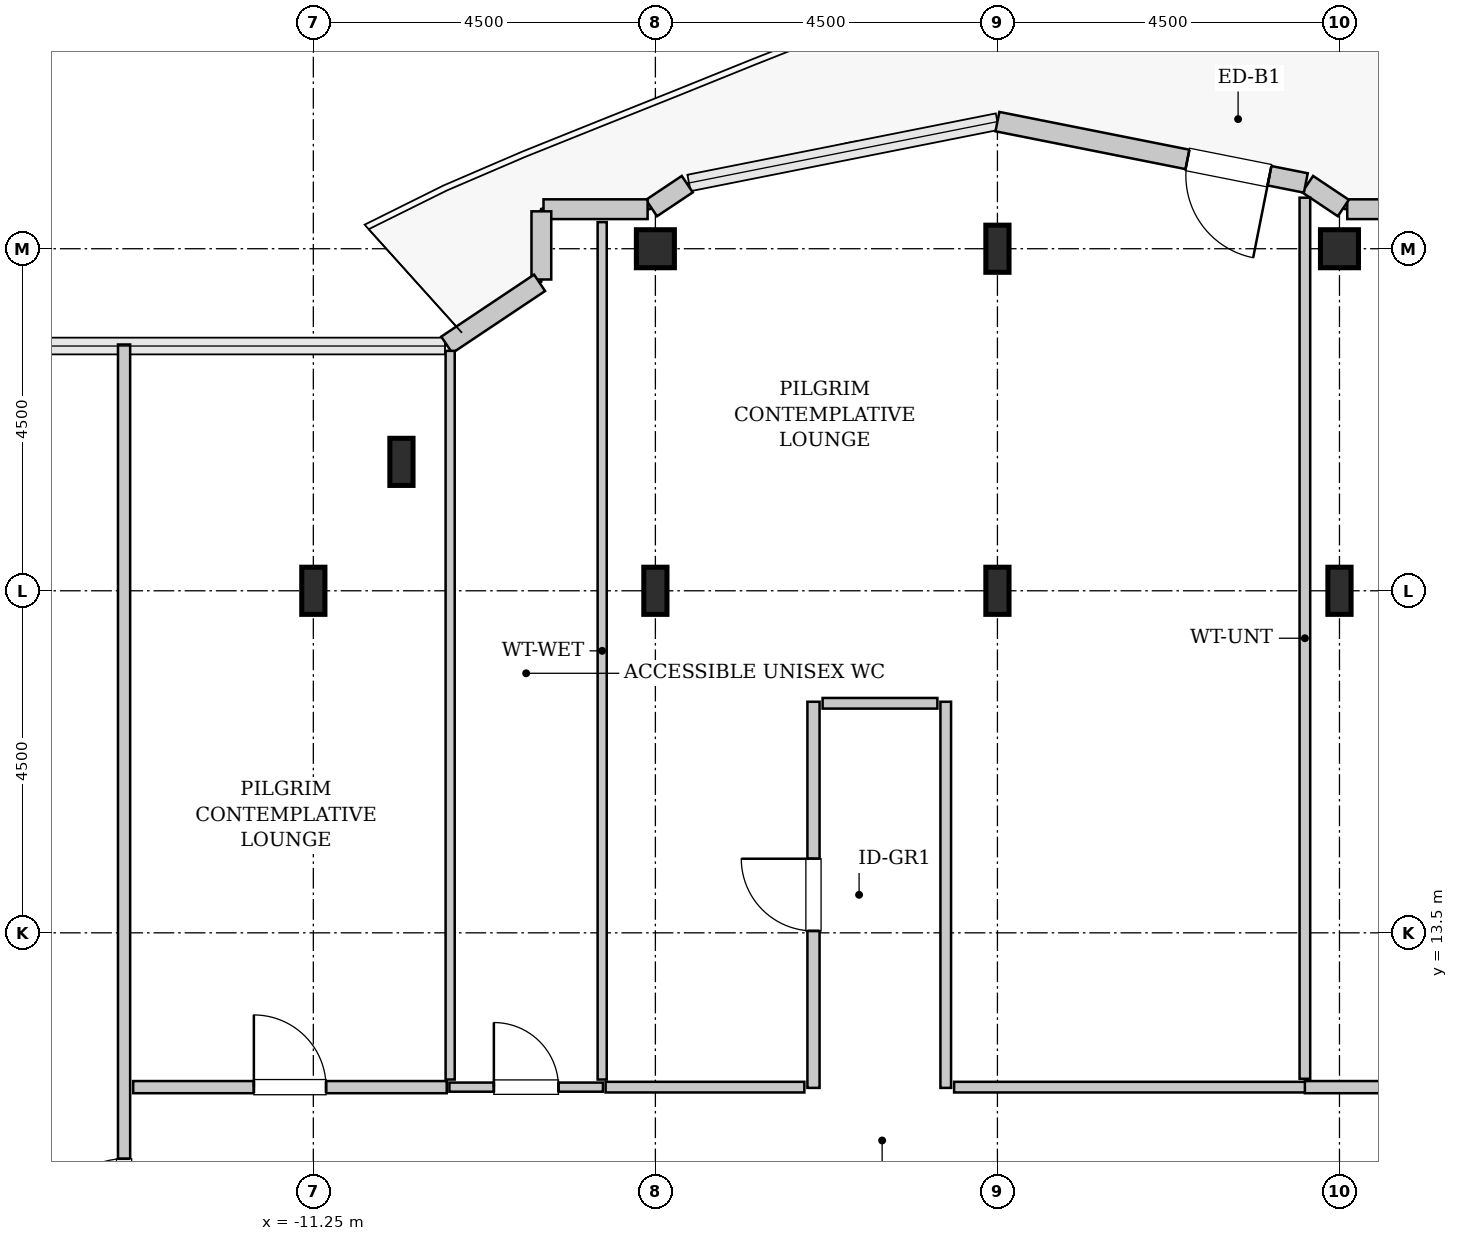
"""IFC4 building model, lengths in metres.
Left out: names, types, materials, properties, quantities, classifications, styles, units other than length and angle.
Written with IfcOpenShell. Run it as: python <this file> out.ifc"""

import sys

from ifc_helpers import new_model, si_unit, direction, frame, frame_2d, origin, origin_2d, place, context, subcontext, project, spatial, rectangle, hollow_rectangle, i_section, extrude, source, transform, mapped, element, fill, save


model = new_model("IFC4")
c1 = context("Model", 3, precision=1e-05, world=origin(), true_north=direction((0.0, 1.0)))
c2 = subcontext(c1, "Body", "Model", "MODEL_VIEW")
j1 = project(units=[si_unit("LENGTHUNIT", "METRE"), si_unit("PLANEANGLEUNIT", "RADIAN")], contexts=[c1])
p1 = place(None, origin())
s1 = spatial("IfcSite", under=j1, at=p1, CompositionType="ELEMENT")
p2 = place(p1, origin())
s2 = spatial("IfcBuilding", under=s1, at=p2, CompositionType="ELEMENT")
p3 = place(p2, frame((0.0, 0.0, 298.8)))
s3 = spatial("IfcBuildingStorey", under=s2, at=p3, CompositionType="ELEMENT", Elevation=298.8)
m1 = source(origin(), c2, "Body", "SweptSolid", [
    extrude(i_section(OverallWidth=0.305, OverallDepth=0.62, WebThickness=0.021, FlangeThickness=0.04, FilletRadius=0.027, at=origin_2d()), origin(), (0.0, 0.0, 1.0), 3.8),
])
for number, where, z_axis, x_axis in (
    (1, (-11.25, 18.0, 0.0), (0.0, 0.0, 1.0), (1.0, 0.0, 0.0)),
    (2, (-10.091, 19.696, 0.0), (0.0, 0.0, 1.0), (1.0, 0.0, 0.0)),
    (3, (-6.75, 18.0, 0.0), (0.0, 0.0, 1.0), (1.0, 0.0, 0.0)),
):
    element("IfcColumn", number, at=place(p3, frame(where, z_axis=z_axis, x_axis=x_axis)), inside=s3, PredefinedType="COLUMN", context=c2, shape_type="MappedRepresentation", body=[
        mapped(m1, transform((0.0, 0.0, 0.0), x_axis=(1.0, 0.0, 0.0), y_axis=(0.0, 1.0, 0.0), z_axis=(0.0, 0.0, 1.0), scale=1.0)),
    ])
m2 = source(origin(), c2, "Body", "SweptSolid", [
    extrude(hollow_rectangle(XDim=0.5, YDim=0.5, WallThickness=0.025, InnerFilletRadius=0.025, OuterFilletRadius=0.05, at=origin_2d()), origin(), (0.0, 0.0, 1.0), 3.8),
])
p4 = place(p3, frame((-6.75, 22.5, 0.0), z_axis=(0.0, 0.0, 1.0), x_axis=(1.0, 0.0, 0.0)))
e4 = element("IfcColumn", 4, at=p4, inside=s3, PredefinedType="COLUMN", context=c2, shape_type="MappedRepresentation", body=[
    mapped(m2, transform((0.0, 0.0, 0.0), x_axis=(1.0, 0.0, 0.0), y_axis=(0.0, 1.0, 0.0), z_axis=(0.0, 0.0, 1.0), scale=1.0)),
])
for number, where, z_axis, x_axis in (
    (5, (-2.25, 18.0, 0.0), (0.0, 0.0, 1.0), (1.0, 0.0, 0.0)),
    (6, (-2.25, 22.5, 0.0), (0.0, 0.0, 1.0), (1.0, 0.0, 0.0)),
    (7, (2.25, 18.0, 0.0), (0.0, 0.0, 1.0), (1.0, 0.0, 0.0)),
):
    element("IfcColumn", number, at=place(p3, frame(where, z_axis=z_axis, x_axis=x_axis)), inside=s3, PredefinedType="COLUMN", context=c2, shape_type="MappedRepresentation", body=[
        mapped(m1, transform((0.0, 0.0, 0.0), x_axis=(1.0, 0.0, 0.0), y_axis=(0.0, 1.0, 0.0), z_axis=(0.0, 0.0, 1.0), scale=1.0)),
    ])
p5 = place(p3, frame((2.25, 22.5, 0.0), z_axis=(0.0, 0.0, 1.0), x_axis=(1.0, 0.0, 0.0)))
e8 = element("IfcColumn", 8, at=p5, inside=s3, PredefinedType="COLUMN", context=c2, shape_type="MappedRepresentation", body=[
    mapped(m2, transform((0.0, 0.0, 0.0), x_axis=(1.0, 0.0, 0.0), y_axis=(0.0, 1.0, 0.0), z_axis=(0.0, 0.0, 1.0), scale=1.0)),
])
m3 = source(origin(), c2, "Body", "SweptSolid", [
    extrude(rectangle(XDim=1.37, YDim=0.26, at=frame_2d((0.685, 0.0))), origin(), (0.0, 0.0, 1.0), 3.55),
])
p6 = place(p3, frame((3.722, 23.02, 0.0), z_axis=(0.0, 0.0, 1.0), x_axis=(-1.0, 0.0, 0.0)))
e9 = element("IfcWall", 9, at=p6, inside=s3, PredefinedType="SOLIDWALL", context=c2, shape_type="MappedRepresentation", body=[
    mapped(m3, transform((0.0, 0.0, 0.0), x_axis=(1.0, 0.0, 0.0), y_axis=(0.0, 1.0, 0.0), z_axis=(0.0, 0.0, 1.0), scale=1.0)),
])
m4 = source(origin(), c2, "Body", "SweptSolid", [
    extrude(rectangle(XDim=0.565, YDim=0.26, at=frame_2d((0.283, 0.0))), origin(), (0.0, 0.0, 1.0), 3.55),
])
p7 = place(p3, frame((2.301, 23.036, 0.0), z_axis=(0.0, 0.0, 1.0), x_axis=(-0.831651492666, 0.555297933317, 0.0)))
e10 = element("IfcWall", 10, at=p7, inside=s3, PredefinedType="SOLIDWALL", context=c2, shape_type="MappedRepresentation", body=[
    mapped(m4, transform((0.0, 0.0, 0.0), x_axis=(1.0, 0.0, 0.0), y_axis=(0.0, 1.0, 0.0), z_axis=(0.0, 0.0, 1.0), scale=1.0)),
])
m5 = source(origin(), c2, "Body", "SweptSolid", [
    extrude(rectangle(XDim=4.137, YDim=0.26, at=frame_2d((2.068, 0.0))), origin(), (0.0, 0.0, 1.0), 3.55),
])
p8 = place(p3, frame((1.807, 23.365, 0.0), z_axis=(0.0, 0.0, 1.0), x_axis=(-0.980782170794, 0.195105954428, 0.0)))
e11 = element("IfcWall", 11, at=p8, inside=s3, PredefinedType="SOLIDWALL", context=c2, shape_type="MappedRepresentation", body=[
    mapped(m5, transform((0.0, 0.0, 0.0), x_axis=(1.0, 0.0, 0.0), y_axis=(0.0, 1.0, 0.0), z_axis=(0.0, 0.0, 1.0), scale=1.0)),
])
p9 = place(p8, frame((0.488, 0.0, 0.0)))
e12 = element("IfcOpeningElement", 12, at=p9, cuts=e11, PredefinedType="OPENING", context=c2, shape_type="SweptSolid", body=[
    extrude(rectangle(XDim=1.1, YDim=2.2, at=frame_2d((0.55, 1.1))), frame((0.0, 0.14, 0.0), z_axis=(0.0, -1.0, 0.0), x_axis=(1.0, 0.0, 0.0)), (0.0, 0.0, 1.0), 0.28),
])
p10 = place(p3, frame((-6.331, 23.35, 0.0), z_axis=(0.0, 0.0, 1.0), x_axis=(-0.831651492666, -0.555297933317, 0.0)))
e13 = element("IfcWall", 13, at=p10, inside=s3, PredefinedType="SOLIDWALL", context=c2, shape_type="MappedRepresentation", body=[
    mapped(m4, transform((0.0, 0.0, 0.0), x_axis=(1.0, 0.0, 0.0), y_axis=(0.0, 1.0, 0.0), z_axis=(0.0, 0.0, 1.0), scale=1.0)),
])
p11 = place(p3, frame((-6.852, 23.02, 0.0), z_axis=(0.0, 0.0, 1.0), x_axis=(-1.0, 0.0, 0.0)))
e14 = element("IfcWall", 14, at=p11, inside=s3, PredefinedType="SOLIDWALL", context=c2, shape_type="MappedRepresentation", body=[
    mapped(m3, transform((0.0, 0.0, 0.0), x_axis=(1.0, 0.0, 0.0), y_axis=(0.0, 1.0, 0.0), z_axis=(0.0, 0.0, 1.0), scale=1.0)),
])
m6 = source(origin(), c2, "Body", "SweptSolid", [
    extrude(rectangle(XDim=0.897, YDim=0.26, at=frame_2d((0.448, 0.0))), origin(), (0.0, 0.0, 1.0), 3.55),
])
p12 = place(p3, frame((-8.25, 22.992, 0.0), z_axis=(0.0, 0.0, 1.0), x_axis=(0.0, -1.0, 0.0)))
e15 = element("IfcWall", 15, at=p12, inside=s3, PredefinedType="SOLIDWALL", context=c2, shape_type="MappedRepresentation", body=[
    mapped(m6, transform((0.0, 0.0, 0.0), x_axis=(1.0, 0.0, 0.0), y_axis=(0.0, 1.0, 0.0), z_axis=(0.0, 0.0, 1.0), scale=1.0)),
])
m7 = source(origin(), c2, "Body", "SweptSolid", [
    extrude(rectangle(XDim=1.469, YDim=0.26, at=frame_2d((0.734, 0.0))), origin(), (0.0, 0.0, 1.0), 3.55),
])
p13 = place(p3, frame((-8.273, 22.052, 0.0), z_axis=(0.0, 0.0, 1.0), x_axis=(-0.831461760506, -0.555581983884, 0.0)))
e16 = element("IfcWall", 16, at=p13, inside=s3, PredefinedType="SOLIDWALL", context=c2, shape_type="MappedRepresentation", body=[
    mapped(m7, transform((0.0, 0.0, 0.0), x_axis=(1.0, 0.0, 0.0), y_axis=(0.0, 1.0, 0.0), z_axis=(0.0, 0.0, 1.0), scale=1.0)),
])
m8 = source(origin(), c2, "Body", "SweptSolid", [
    extrude(rectangle(XDim=2.02, YDim=0.12, at=frame_2d((1.01, 0.0))), origin(), (0.0, 0.0, 1.0), 3.535),
])
p14 = place(p3, frame((-9.46, 11.47, 0.0), z_axis=(0.0, 0.0, 1.0), x_axis=(1.0, 0.0, 0.0)))
e17 = element("IfcWall", 17, at=p14, inside=s3, PredefinedType="PLUMBINGWALL", context=c2, shape_type="MappedRepresentation", body=[
    mapped(m8, transform((0.0, 0.0, 0.0), x_axis=(1.0, 0.0, 0.0), y_axis=(0.0, 1.0, 0.0), z_axis=(0.0, 0.0, 1.0), scale=1.0)),
])
p15 = place(p14, frame((0.585, 0.0, 0.0)))
e18 = element("IfcOpeningElement", 18, at=p15, cuts=e17, PredefinedType="OPENING", context=c2, shape_type="SweptSolid", body=[
    extrude(rectangle(XDim=0.85, YDim=2.1, at=frame_2d((0.425, 1.05))), frame((0.0, 0.07, 0.0), z_axis=(0.0, -1.0, 0.0), x_axis=(1.0, 0.0, 0.0)), (0.0, 0.0, 1.0), 0.14),
])
m9 = source(origin(), c2, "Body", "SweptSolid", [
    extrude(rectangle(XDim=11.28, YDim=0.12, at=frame_2d((5.64, 0.0))), origin(), (0.0, 0.0, 1.0), 3.535),
])
p16 = place(p3, frame((-7.45, 11.57, 0.0), z_axis=(0.0, 0.0, 1.0), x_axis=(0.0, 1.0, 0.0)))
e19 = element("IfcWall", 19, at=p16, inside=s3, PredefinedType="PLUMBINGWALL", context=c2, shape_type="MappedRepresentation", body=[
    mapped(m9, transform((0.0, 0.0, 0.0), x_axis=(1.0, 0.0, 0.0), y_axis=(0.0, 1.0, 0.0), z_axis=(0.0, 0.0, 1.0), scale=1.0)),
])
m10 = source(origin(), c2, "Body", "SweptSolid", [
    extrude(rectangle(XDim=9.587, YDim=0.12, at=frame_2d((4.793, 0.0))), origin(), (0.0, 0.0, 1.0), 3.535),
])
p17 = place(p3, frame((-9.45, 11.57, 0.0), z_axis=(0.0, 0.0, 1.0), x_axis=(0.0, 1.0, 0.0)))
e20 = element("IfcWall", 20, at=p17, inside=s3, PredefinedType="PLUMBINGWALL", context=c2, shape_type="MappedRepresentation", body=[
    mapped(m10, transform((0.0, 0.0, 0.0), x_axis=(1.0, 0.0, 0.0), y_axis=(0.0, 1.0, 0.0), z_axis=(0.0, 0.0, 1.0), scale=1.0)),
])
m11 = source(origin(), c2, "Body", "SweptSolid", [
    extrude(rectangle(XDim=12.645, YDim=0.16, at=frame_2d((6.323, 0.0))), origin(), (0.0, 0.0, 1.0), 3.535),
])
p18 = place(p3, frame((-13.74, 8.595, 0.0), z_axis=(0.0, 0.0, 1.0), x_axis=(0.0, 1.0, 0.0)))
e21 = element("IfcWall", 21, at=p18, inside=s3, PredefinedType="PARTITIONING", context=c2, shape_type="MappedRepresentation", body=[
    mapped(m11, transform((0.0, 0.0, 0.0), x_axis=(1.0, 0.0, 0.0), y_axis=(0.0, 1.0, 0.0), z_axis=(0.0, 0.0, 1.0), scale=1.0)),
])
p19 = place(p18, frame((0.982, 0.0, 0.0)))
e22 = element("IfcOpeningElement", 22, at=p19, cuts=e21, PredefinedType="OPENING", context=c2, shape_type="SweptSolid", body=[
    extrude(rectangle(XDim=0.95, YDim=2.1, at=frame_2d((0.475, 1.05))), frame((0.0, 0.09, 0.0), z_axis=(0.0, -1.0, 0.0), x_axis=(1.0, 0.0, 0.0)), (0.0, 0.0, 1.0), 0.18),
])
m12 = source(origin(), c2, "Body", "SweptSolid", [
    extrude(rectangle(XDim=4.125, YDim=0.16, at=frame_2d((2.062, 0.0))), origin(), (0.0, 0.0, 1.0), 3.535),
])
p20 = place(p3, frame((-13.62, 11.47, 0.0), z_axis=(0.0, 0.0, 1.0), x_axis=(1.0, 0.0, 0.0)))
e23 = element("IfcWall", 23, at=p20, inside=s3, PredefinedType="PARTITIONING", context=c2, shape_type="MappedRepresentation", body=[
    mapped(m12, transform((0.0, 0.0, 0.0), x_axis=(1.0, 0.0, 0.0), y_axis=(0.0, 1.0, 0.0), z_axis=(0.0, 0.0, 1.0), scale=1.0)),
])
p21 = place(p20, frame((1.587, 0.0, 0.0)))
e24 = element("IfcOpeningElement", 24, at=p21, cuts=e23, PredefinedType="OPENING", context=c2, shape_type="SweptSolid", body=[
    extrude(rectangle(XDim=0.95, YDim=2.1, at=frame_2d((0.475, 1.05))), frame((0.0, 0.09, 0.0), z_axis=(0.0, -1.0, 0.0), x_axis=(1.0, 0.0, 0.0)), (0.0, 0.0, 1.0), 0.18),
])
m13 = source(origin(), c2, "Body", "SweptSolid", [
    extrude(rectangle(XDim=5.08, YDim=0.16, at=frame_2d((2.54, 0.0))), origin(), (0.0, 0.0, 1.0), 3.535),
])
p22 = place(p3, frame((-4.67, 11.46, 0.0), z_axis=(0.0, 0.0, 1.0), x_axis=(0.0, 1.0, 0.0)))
e25 = element("IfcWall", 25, at=p22, inside=s3, PredefinedType="PARTITIONING", context=c2, shape_type="MappedRepresentation", body=[
    mapped(m13, transform((0.0, 0.0, 0.0), x_axis=(1.0, 0.0, 0.0), y_axis=(0.0, 1.0, 0.0), z_axis=(0.0, 0.0, 1.0), scale=1.0)),
])
p23 = place(p22, frame((2.065, 0.0, 0.0)))
e26 = element("IfcOpeningElement", 26, at=p23, cuts=e25, PredefinedType="OPENING", context=c2, shape_type="SweptSolid", body=[
    extrude(rectangle(XDim=0.95, YDim=2.1, at=frame_2d((0.475, 1.05))), frame((0.0, 0.09, 0.0), z_axis=(0.0, -1.0, 0.0), x_axis=(1.0, 0.0, 0.0)), (0.0, 0.0, 1.0), 0.18),
])
m14 = source(origin(), c2, "Body", "SweptSolid", [
    extrude(rectangle(XDim=5.08, YDim=0.14, at=frame_2d((2.54, 0.0))), origin(), (0.0, 0.0, 1.0), 3.535),
])
p24 = place(p3, frame((-2.93, 11.46, 0.0), z_axis=(0.0, 0.0, 1.0), x_axis=(0.0, 1.0, 0.0)))
e27 = element("IfcWall", 27, at=p24, inside=s3, PredefinedType="PARTITIONING", context=c2, shape_type="MappedRepresentation", body=[
    mapped(m14, transform((0.0, 0.0, 0.0), x_axis=(1.0, 0.0, 0.0), y_axis=(0.0, 1.0, 0.0), z_axis=(0.0, 0.0, 1.0), scale=1.0)),
])
m15 = source(origin(), c2, "Body", "SweptSolid", [
    extrude(rectangle(XDim=4.625, YDim=0.14, at=frame_2d((2.312, 0.0))), origin(), (0.0, 0.0, 1.0), 3.535),
])
p25 = place(p3, frame((-2.82, 11.47, 0.0), z_axis=(0.0, 0.0, 1.0), x_axis=(1.0, 0.0, 0.0)))
e28 = element("IfcWall", 28, at=p25, inside=s3, PredefinedType="PARTITIONING", context=c2, shape_type="MappedRepresentation", body=[
    mapped(m15, transform((0.0, 0.0, 0.0), x_axis=(1.0, 0.0, 0.0), y_axis=(0.0, 1.0, 0.0), z_axis=(0.0, 0.0, 1.0), scale=1.0)),
])
m16 = source(origin(), c2, "Body", "SweptSolid", [
    extrude(rectangle(XDim=2.615, YDim=0.14, at=frame_2d((1.308, 0.0))), origin(), (0.0, 0.0, 1.0), 3.535),
])
p26 = place(p3, frame((-7.405, 11.47, 0.0), z_axis=(0.0, 0.0, 1.0), x_axis=(1.0, 0.0, 0.0)))
e29 = element("IfcWall", 29, at=p26, inside=s3, PredefinedType="PARTITIONING", context=c2, shape_type="MappedRepresentation", body=[
    mapped(m16, transform((0.0, 0.0, 0.0), x_axis=(1.0, 0.0, 0.0), y_axis=(0.0, 1.0, 0.0), z_axis=(0.0, 0.0, 1.0), scale=1.0)),
])
m17 = source(origin(), c2, "Body", "SweptSolid", [
    extrude(rectangle(XDim=1.51, YDim=0.14, at=frame_2d((0.755, 0.0))), origin(), (0.0, 0.0, 1.0), 3.535),
])
p27 = place(p3, frame((-4.55, 16.52, 0.0), z_axis=(0.0, 0.0, 1.0), x_axis=(1.0, 0.0, 0.0)))
e30 = element("IfcWall", 30, at=p27, inside=s3, PredefinedType="PARTITIONING", context=c2, shape_type="MappedRepresentation", body=[
    mapped(m17, transform((0.0, 0.0, 0.0), x_axis=(1.0, 0.0, 0.0), y_axis=(0.0, 1.0, 0.0), z_axis=(0.0, 0.0, 1.0), scale=1.0)),
])
m18 = source(origin(), c2, "Body", "SweptSolid", [
    extrude(rectangle(XDim=11.591, YDim=0.14, at=frame_2d((5.796, 0.0))), origin(), (0.0, 0.0, 1.0), 2.925),
])
p28 = place(p3, frame((1.795, 11.58, 0.0), z_axis=(0.0, 0.0, 1.0), x_axis=(0.0, 1.0, 0.0)))
e31 = element("IfcWall", 31, at=p28, inside=s3, PredefinedType="PARTITIONING", context=c2, shape_type="MappedRepresentation", body=[
    mapped(m18, transform((0.0, 0.0, 0.0), x_axis=(1.0, 0.0, 0.0), y_axis=(0.0, 1.0, 0.0), z_axis=(0.0, 0.0, 1.0), scale=1.0)),
])
m19 = source(origin(), c2, "Body", "SweptSolid", [
    extrude(rectangle(XDim=6.61, YDim=0.16, at=frame_2d((3.305, 0.0))), origin(), (0.0, 0.0, 1.0), 3.535),
])
p29 = place(p3, frame((1.795, 11.47, 0.0), z_axis=(0.0, 0.0, 1.0), x_axis=(1.0, 0.0, 0.0)))
e32 = element("IfcWall", 32, at=p29, inside=s3, PredefinedType="PARTITIONING", context=c2, shape_type="MappedRepresentation", body=[
    mapped(m19, transform((0.0, 0.0, 0.0), x_axis=(1.0, 0.0, 0.0), y_axis=(0.0, 1.0, 0.0), z_axis=(0.0, 0.0, 1.0), scale=1.0)),
])
p30 = place(p29, frame((2.83, 0.0, 0.0)))
e33 = element("IfcOpeningElement", 33, at=p30, cuts=e32, PredefinedType="OPENING", context=c2, shape_type="SweptSolid", body=[
    extrude(rectangle(XDim=0.95, YDim=2.1, at=frame_2d((0.475, 1.05))), frame((0.0, 0.09, 0.0), z_axis=(0.0, -1.0, 0.0), x_axis=(1.0, 0.0, 0.0)), (0.0, 0.0, 1.0), 0.18),
])
m20 = source(origin(), c2, "Body", "SweptSolid", [
    extrude(rectangle(XDim=1.1, YDim=2.2, at=frame_2d((0.55, 1.1))), frame((0.0, 0.025, 0.0), z_axis=(0.0, -1.0, 0.0), x_axis=(1.0, 0.0, 0.0)), (0.0, 0.0, 1.0), 0.05),
])
p31 = place(p9, origin())
e34 = element("IfcDoor", 34, at=p31, inside=s3, OperationType="SINGLE_SWING_LEFT", PredefinedType="DOOR", context=c2, shape_type="MappedRepresentation", body=[
    mapped(m20, transform((0.0, 0.0, 0.0), x_axis=(1.0, 0.0, 0.0), y_axis=(0.0, 1.0, 0.0), z_axis=(0.0, 0.0, 1.0), scale=1.0)),
])
fill(e12, e34)
m21 = source(origin(), c2, "Body", "SweptSolid", [
    extrude(rectangle(XDim=0.85, YDim=2.1, at=frame_2d((0.425, 1.05))), frame((0.0, 0.025, 0.0), z_axis=(0.0, -1.0, 0.0), x_axis=(1.0, 0.0, 0.0)), (0.0, 0.0, 1.0), 0.05),
])
p32 = place(p15, origin())
e35 = element("IfcDoor", 35, at=p32, inside=s3, OperationType="SINGLE_SWING_LEFT", PredefinedType="DOOR", context=c2, shape_type="MappedRepresentation", body=[
    mapped(m21, transform((0.0, 0.0, 0.0), x_axis=(1.0, 0.0, 0.0), y_axis=(0.0, 1.0, 0.0), z_axis=(0.0, 0.0, 1.0), scale=1.0)),
])
fill(e18, e35)
m22 = source(origin(), c2, "Body", "SweptSolid", [
    extrude(rectangle(XDim=0.95, YDim=2.1, at=frame_2d((0.475, 1.05))), frame((0.0, 0.025, 0.0), z_axis=(0.0, -1.0, 0.0), x_axis=(1.0, 0.0, 0.0)), (0.0, 0.0, 1.0), 0.05),
])
p33 = place(p19, origin())
e36 = element("IfcDoor", 36, at=p33, inside=s3, OperationType="SINGLE_SWING_LEFT", PredefinedType="DOOR", context=c2, shape_type="MappedRepresentation", body=[
    mapped(m22, transform((0.0, 0.0, 0.0), x_axis=(1.0, 0.0, 0.0), y_axis=(0.0, 1.0, 0.0), z_axis=(0.0, 0.0, 1.0), scale=1.0)),
])
fill(e22, e36)
p34 = place(p21, origin())
e37 = element("IfcDoor", 37, at=p34, inside=s3, OperationType="SINGLE_SWING_LEFT", PredefinedType="DOOR", context=c2, shape_type="MappedRepresentation", body=[
    mapped(m22, transform((0.0, 0.0, 0.0), x_axis=(1.0, 0.0, 0.0), y_axis=(0.0, 1.0, 0.0), z_axis=(0.0, 0.0, 1.0), scale=1.0)),
])
fill(e24, e37)
p35 = place(p23, origin())
e38 = element("IfcDoor", 38, at=p35, inside=s3, OperationType="SINGLE_SWING_RIGHT", PredefinedType="DOOR", context=c2, shape_type="MappedRepresentation", body=[
    mapped(m22, transform((0.0, 0.0, 0.0), x_axis=(1.0, 0.0, 0.0), y_axis=(0.0, 1.0, 0.0), z_axis=(0.0, 0.0, 1.0), scale=1.0)),
])
fill(e26, e38)
save(model, sys.argv[1])
